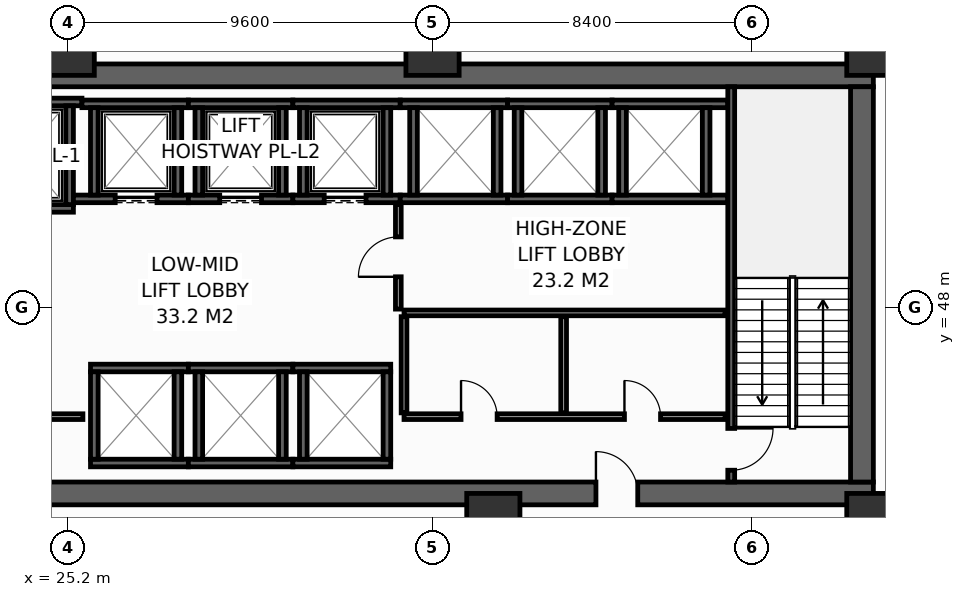
"""IFC4 building model, lengths in metres.
Left out: names, types, materials, properties, quantities, classifications, styles, units other than length and angle.
Written with IfcOpenShell. Run it as: python <this file> out.ifc"""

import sys

from ifc_helpers import new_model, si_unit, direction, frame, frame_2d, origin, origin_2d, place, context, subcontext, project, spatial, rectangle, hollow_rectangle, extrude, element, fill, save


model = new_model("IFC4")
c1 = context("Model", 3, precision=1e-05, world=origin(), true_north=direction((0.0, 1.0)))
c2 = subcontext(c1, "Body", "Model", "MODEL_VIEW")
j1 = project(units=[si_unit("LENGTHUNIT", "METRE"), si_unit("PLANEANGLEUNIT", "RADIAN")], contexts=[c1])
p1 = place(None, origin())
s1 = spatial("IfcSite", under=j1, at=p1, CompositionType="ELEMENT")
p2 = place(p1, origin())
s2 = spatial("IfcBuilding", under=s1, at=p2, CompositionType="ELEMENT")
p3 = place(p2, frame((0.0, 0.0, 16.8)))
s3 = spatial("IfcBuildingStorey", under=s2, at=p3, CompositionType="ELEMENT", Elevation=16.8)
p4 = place(p3, frame((13.5, 43.1, 0.0), z_axis=(0.0, 0.0, 1.0), x_axis=(1.0, 0.0, 0.0)))
e1 = element("IfcWall", 1, at=p4, inside=s3, PredefinedType="SHEAR", context=c2, shape_type="SweptSolid", body=[
    extrude(rectangle(XDim=32.9, YDim=0.6, at=frame_2d((16.45, 0.0))), origin(), (0.0, 0.0, 1.0), 5.1),
])
p5 = place(p4, frame((5.4, 0.0, 0.0)))
e2 = element("IfcOpeningElement", 2, at=p5, cuts=e1, PredefinedType="OPENING", context=c2, shape_type="SweptSolid", body=[
    extrude(rectangle(XDim=1.1, YDim=2.15, at=frame_2d((0.55, 1.075))), frame((0.0, 0.31, 0.0), z_axis=(0.0, -1.0, 0.0), x_axis=(1.0, 0.0, 0.0)), (0.0, 0.0, 1.0), 0.62),
])
p6 = place(p4, frame((25.6, 0.0, 0.0)))
e3 = element("IfcOpeningElement", 3, at=p6, cuts=e1, PredefinedType="OPENING", context=c2, shape_type="SweptSolid", body=[
    extrude(rectangle(XDim=1.1, YDim=2.15, at=frame_2d((0.55, 1.075))), frame((0.0, 0.31, 0.0), z_axis=(0.0, -1.0, 0.0), x_axis=(1.0, 0.0, 0.0)), (0.0, 0.0, 1.0), 0.62),
])
p7 = place(p3, frame((13.5, 54.1, 0.0), z_axis=(0.0, 0.0, 1.0), x_axis=(1.0, 0.0, 0.0)))
e4 = element("IfcWall", 4, at=p7, inside=s3, PredefinedType="SHEAR", context=c2, shape_type="SweptSolid", body=[
    extrude(rectangle(XDim=32.9, YDim=0.6, at=frame_2d((16.45, 0.0))), origin(), (0.0, 0.0, 1.0), 5.1),
])
p8 = place(p3, frame((46.1, 43.4, 0.0), z_axis=(0.0, 0.0, 1.0), x_axis=(0.0, 1.0, 0.0)))
e5 = element("IfcWall", 5, at=p8, inside=s3, PredefinedType="SHEAR", context=c2, shape_type="SweptSolid", body=[
    extrude(rectangle(XDim=10.4, YDim=0.6, at=frame_2d((5.2, 0.0))), origin(), (0.0, 0.0, 1.0), 5.1),
])
for number, where, z_axis, x_axis in (
    (6, (25.2, 54.8, 0.0), (0.0, 0.0, 1.0), (1.0, 0.0, 0.0)),
    (7, (34.8, 54.8, 0.0), (0.0, 0.0, 1.0), (1.0, 0.0, 0.0)),
    (8, (46.4, 54.8, 0.0), (0.0, 0.0, 1.0), (1.0, 0.0, 0.0)),
    (9, (36.4, 42.4, 0.0), (0.0, 0.0, 1.0), (1.0, 0.0, 0.0)),
    (10, (46.4, 42.4, 0.0), (0.0, 0.0, 1.0), (1.0, 0.0, 0.0)),
):
    element("IfcColumn", number, at=place(p3, frame(where, z_axis=z_axis, x_axis=x_axis)), inside=s3, PredefinedType="COLUMN", context=c2, shape_type="SweptSolid", body=[
        extrude(hollow_rectangle(XDim=1.4, YDim=1.4, WallThickness=0.065, at=origin_2d()), origin(), (0.0, 0.0, 1.0), 5.4),
    ])
p9 = place(p3, frame((22.5, 50.6, 0.0), z_axis=(0.0, 0.0, 1.0), x_axis=(1.0, 0.0, 0.0)))
e11 = element("IfcWall", 11, at=p9, inside=s3, PredefinedType="SHEAR", context=c2, shape_type="SweptSolid", body=[
    extrude(rectangle(XDim=2.85, YDim=0.2, at=frame_2d((1.425, 0.0))), origin(), (0.0, 0.0, 1.0), 5.1),
])
p10 = place(p9, frame((0.925, 0.0, 0.0)))
e12 = element("IfcOpeningElement", 12, at=p10, cuts=e11, PredefinedType="OPENING", context=c2, shape_type="SweptSolid", body=[
    extrude(rectangle(XDim=1.25, YDim=2.3, at=frame_2d((0.625, 1.15))), frame((0.0, 0.11, 0.0), z_axis=(0.0, -1.0, 0.0), x_axis=(1.0, 0.0, 0.0)), (0.0, 0.0, 1.0), 0.22),
])
p11 = place(p3, frame((22.5, 53.4, 0.0), z_axis=(0.0, 0.0, 1.0), x_axis=(1.0, 0.0, 0.0)))
e13 = element("IfcWall", 13, at=p11, inside=s3, PredefinedType="SHEAR", context=c2, shape_type="SweptSolid", body=[
    extrude(rectangle(XDim=3.075, YDim=0.2, at=frame_2d((1.538, 0.0))), origin(), (0.0, 0.0, 1.0), 5.1),
])
p12 = place(p3, frame((25.25, 50.7, 0.0), z_axis=(0.0, 0.0, 1.0), x_axis=(0.0, 1.0, 0.0)))
e14 = element("IfcWall", 14, at=p12, inside=s3, PredefinedType="SHEAR", context=c2, shape_type="SweptSolid", body=[
    extrude(rectangle(XDim=2.6, YDim=0.2, at=frame_2d((1.3, 0.0))), origin(), (0.0, 0.0, 1.0), 5.1),
])
p13 = place(p3, frame((25.35, 50.85, 0.0), z_axis=(0.0, 0.0, 1.0), x_axis=(1.0, 0.0, 0.0)))
e15 = element("IfcWall", 15, at=p13, inside=s3, PredefinedType="SHEAR", context=c2, shape_type="SweptSolid", body=[
    extrude(rectangle(XDim=3.025, YDim=0.2, at=frame_2d((1.512, 0.0))), origin(), (0.0, 0.0, 1.0), 5.1),
])
p14 = place(p13, frame((1.1, 0.0, 0.0)))
e16 = element("IfcOpeningElement", 16, at=p14, cuts=e15, PredefinedType="OPENING", context=c2, shape_type="SweptSolid", body=[
    extrude(rectangle(XDim=1.1, YDim=2.2, at=frame_2d((0.55, 1.1))), frame((0.0, 0.11, 0.0), z_axis=(0.0, -1.0, 0.0), x_axis=(1.0, 0.0, 0.0)), (0.0, 0.0, 1.0), 0.22),
])
p15 = place(p3, frame((25.575, 53.35, 0.0), z_axis=(0.0, 0.0, 1.0), x_axis=(1.0, 0.0, 0.0)))
e17 = element("IfcWall", 17, at=p15, inside=s3, PredefinedType="SHEAR", context=c2, shape_type="SweptSolid", body=[
    extrude(rectangle(XDim=2.8, YDim=0.2, at=frame_2d((1.4, 0.0))), origin(), (0.0, 0.0, 1.0), 5.1),
])
for number, where, z_axis, x_axis in (
    (18, (25.9, 50.95, 0.0), (0.0, 0.0, 1.0), (0.0, 1.0, 0.0)),
    (19, (28.1, 50.95, 0.0), (0.0, 0.0, 1.0), (0.0, 1.0, 0.0)),
):
    element("IfcWall", number, at=place(p3, frame(where, z_axis=z_axis, x_axis=x_axis)), inside=s3, PredefinedType="SHEAR", context=c2, shape_type="SweptSolid", body=[
        extrude(rectangle(XDim=2.3, YDim=0.2, at=frame_2d((1.15, 0.0))), origin(), (0.0, 0.0, 1.0), 5.1),
    ])
p16 = place(p3, frame((28.375, 50.85, 0.0), z_axis=(0.0, 0.0, 1.0), x_axis=(1.0, 0.0, 0.0)))
e20 = element("IfcWall", 20, at=p16, inside=s3, PredefinedType="SHEAR", context=c2, shape_type="SweptSolid", body=[
    extrude(rectangle(XDim=2.75, YDim=0.2, at=frame_2d((1.375, 0.0))), origin(), (0.0, 0.0, 1.0), 5.1),
])
p17 = place(p16, frame((0.825, 0.0, 0.0)))
e21 = element("IfcOpeningElement", 21, at=p17, cuts=e20, PredefinedType="OPENING", context=c2, shape_type="SweptSolid", body=[
    extrude(rectangle(XDim=1.1, YDim=2.2, at=frame_2d((0.55, 1.1))), frame((0.0, 0.11, 0.0), z_axis=(0.0, -1.0, 0.0), x_axis=(1.0, 0.0, 0.0)), (0.0, 0.0, 1.0), 0.22),
])
p18 = place(p3, frame((28.375, 53.35, 0.0), z_axis=(0.0, 0.0, 1.0), x_axis=(1.0, 0.0, 0.0)))
e22 = element("IfcWall", 22, at=p18, inside=s3, PredefinedType="SHEAR", context=c2, shape_type="SweptSolid", body=[
    extrude(rectangle(XDim=2.75, YDim=0.2, at=frame_2d((1.375, 0.0))), origin(), (0.0, 0.0, 1.0), 5.1),
])
for number, where, z_axis, x_axis in (
    (23, (28.65, 50.95, 0.0), (0.0, 0.0, 1.0), (0.0, 1.0, 0.0)),
    (24, (30.85, 50.95, 0.0), (0.0, 0.0, 1.0), (0.0, 1.0, 0.0)),
):
    element("IfcWall", number, at=place(p3, frame(where, z_axis=z_axis, x_axis=x_axis)), inside=s3, PredefinedType="SHEAR", context=c2, shape_type="SweptSolid", body=[
        extrude(rectangle(XDim=2.3, YDim=0.2, at=frame_2d((1.15, 0.0))), origin(), (0.0, 0.0, 1.0), 5.1),
    ])
p19 = place(p3, frame((31.125, 50.85, 0.0), z_axis=(0.0, 0.0, 1.0), x_axis=(1.0, 0.0, 0.0)))
e25 = element("IfcWall", 25, at=p19, inside=s3, PredefinedType="SHEAR", context=c2, shape_type="SweptSolid", body=[
    extrude(rectangle(XDim=2.825, YDim=0.2, at=frame_2d((1.413, 0.0))), origin(), (0.0, 0.0, 1.0), 5.1),
])
p20 = place(p19, frame((0.825, 0.0, 0.0)))
e26 = element("IfcOpeningElement", 26, at=p20, cuts=e25, PredefinedType="OPENING", context=c2, shape_type="SweptSolid", body=[
    extrude(rectangle(XDim=1.1, YDim=2.2, at=frame_2d((0.55, 1.1))), frame((0.0, 0.11, 0.0), z_axis=(0.0, -1.0, 0.0), x_axis=(1.0, 0.0, 0.0)), (0.0, 0.0, 1.0), 0.22),
])
p21 = place(p3, frame((31.125, 53.35, 0.0), z_axis=(0.0, 0.0, 1.0), x_axis=(1.0, 0.0, 0.0)))
e27 = element("IfcWall", 27, at=p21, inside=s3, PredefinedType="SHEAR", context=c2, shape_type="SweptSolid", body=[
    extrude(rectangle(XDim=2.825, YDim=0.2, at=frame_2d((1.413, 0.0))), origin(), (0.0, 0.0, 1.0), 5.1),
])
for number, where, z_axis, x_axis in (
    (28, (31.4, 50.95, 0.0), (0.0, 0.0, 1.0), (0.0, 1.0, 0.0)),
    (29, (33.6, 50.95, 0.0), (0.0, 0.0, 1.0), (0.0, 1.0, 0.0)),
):
    element("IfcWall", number, at=place(p3, frame(where, z_axis=z_axis, x_axis=x_axis)), inside=s3, PredefinedType="SHEAR", context=c2, shape_type="SweptSolid", body=[
        extrude(rectangle(XDim=2.3, YDim=0.2, at=frame_2d((1.15, 0.0))), origin(), (0.0, 0.0, 1.0), 5.1),
    ])
for number, where, z_axis, x_axis in (
    (30, (25.8, 43.9, 0.0), (0.0, 0.0, 1.0), (1.0, 0.0, 0.0)),
    (31, (25.8, 46.4, 0.0), (0.0, 0.0, 1.0), (1.0, 0.0, 0.0)),
):
    element("IfcWall", number, at=place(p3, frame(where, z_axis=z_axis, x_axis=x_axis)), inside=s3, PredefinedType="SHEAR", context=c2, shape_type="SweptSolid", body=[
        extrude(rectangle(XDim=2.575, YDim=0.2, at=frame_2d((1.288, 0.0))), origin(), (0.0, 0.0, 1.0), 5.1),
    ])
for number, where, z_axis, x_axis in (
    (32, (25.9, 44.0, 0.0), (0.0, 0.0, 1.0), (0.0, 1.0, 0.0)),
    (33, (28.1, 44.0, 0.0), (0.0, 0.0, 1.0), (0.0, 1.0, 0.0)),
):
    element("IfcWall", number, at=place(p3, frame(where, z_axis=z_axis, x_axis=x_axis)), inside=s3, PredefinedType="SHEAR", context=c2, shape_type="SweptSolid", body=[
        extrude(rectangle(XDim=2.3, YDim=0.2, at=frame_2d((1.15, 0.0))), origin(), (0.0, 0.0, 1.0), 5.1),
    ])
for number, where, z_axis, x_axis in (
    (34, (28.375, 43.9, 0.0), (0.0, 0.0, 1.0), (1.0, 0.0, 0.0)),
    (35, (28.375, 46.4, 0.0), (0.0, 0.0, 1.0), (1.0, 0.0, 0.0)),
):
    element("IfcWall", number, at=place(p3, frame(where, z_axis=z_axis, x_axis=x_axis)), inside=s3, PredefinedType="SHEAR", context=c2, shape_type="SweptSolid", body=[
        extrude(rectangle(XDim=2.75, YDim=0.2, at=frame_2d((1.375, 0.0))), origin(), (0.0, 0.0, 1.0), 5.1),
    ])
for number, where, z_axis, x_axis in (
    (36, (28.65, 44.0, 0.0), (0.0, 0.0, 1.0), (0.0, 1.0, 0.0)),
    (37, (30.85, 44.0, 0.0), (0.0, 0.0, 1.0), (0.0, 1.0, 0.0)),
):
    element("IfcWall", number, at=place(p3, frame(where, z_axis=z_axis, x_axis=x_axis)), inside=s3, PredefinedType="SHEAR", context=c2, shape_type="SweptSolid", body=[
        extrude(rectangle(XDim=2.3, YDim=0.2, at=frame_2d((1.15, 0.0))), origin(), (0.0, 0.0, 1.0), 5.1),
    ])
for number, where, z_axis, x_axis in (
    (38, (31.125, 43.9, 0.0), (0.0, 0.0, 1.0), (1.0, 0.0, 0.0)),
    (39, (31.125, 46.4, 0.0), (0.0, 0.0, 1.0), (1.0, 0.0, 0.0)),
):
    element("IfcWall", number, at=place(p3, frame(where, z_axis=z_axis, x_axis=x_axis)), inside=s3, PredefinedType="SHEAR", context=c2, shape_type="SweptSolid", body=[
        extrude(rectangle(XDim=2.575, YDim=0.2, at=frame_2d((1.288, 0.0))), origin(), (0.0, 0.0, 1.0), 5.1),
    ])
for number, where, z_axis, x_axis in (
    (40, (31.4, 44.0, 0.0), (0.0, 0.0, 1.0), (0.0, 1.0, 0.0)),
    (41, (33.6, 44.0, 0.0), (0.0, 0.0, 1.0), (0.0, 1.0, 0.0)),
):
    element("IfcWall", number, at=place(p3, frame(where, z_axis=z_axis, x_axis=x_axis)), inside=s3, PredefinedType="SHEAR", context=c2, shape_type="SweptSolid", body=[
        extrude(rectangle(XDim=2.3, YDim=0.2, at=frame_2d((1.15, 0.0))), origin(), (0.0, 0.0, 1.0), 5.1),
    ])
for number, where, z_axis, x_axis in (
    (42, (33.95, 50.85, 0.0), (0.0, 0.0, 1.0), (1.0, 0.0, 0.0)),
    (43, (33.95, 53.35, 0.0), (0.0, 0.0, 1.0), (1.0, 0.0, 0.0)),
):
    element("IfcWall", number, at=place(p3, frame(where, z_axis=z_axis, x_axis=x_axis)), inside=s3, PredefinedType="SHEAR", context=c2, shape_type="SweptSolid", body=[
        extrude(rectangle(XDim=2.825, YDim=0.2, at=frame_2d((1.413, 0.0))), origin(), (0.0, 0.0, 1.0), 5.1),
    ])
for number, where, z_axis, x_axis in (
    (44, (34.3, 50.95, 0.0), (0.0, 0.0, 1.0), (0.0, 1.0, 0.0)),
    (45, (36.5, 50.95, 0.0), (0.0, 0.0, 1.0), (0.0, 1.0, 0.0)),
):
    element("IfcWall", number, at=place(p3, frame(where, z_axis=z_axis, x_axis=x_axis)), inside=s3, PredefinedType="SHEAR", context=c2, shape_type="SweptSolid", body=[
        extrude(rectangle(XDim=2.3, YDim=0.2, at=frame_2d((1.15, 0.0))), origin(), (0.0, 0.0, 1.0), 5.1),
    ])
for number, where, z_axis, x_axis in (
    (46, (36.775, 50.85, 0.0), (0.0, 0.0, 1.0), (1.0, 0.0, 0.0)),
    (47, (36.775, 53.35, 0.0), (0.0, 0.0, 1.0), (1.0, 0.0, 0.0)),
):
    element("IfcWall", number, at=place(p3, frame(where, z_axis=z_axis, x_axis=x_axis)), inside=s3, PredefinedType="SHEAR", context=c2, shape_type="SweptSolid", body=[
        extrude(rectangle(XDim=2.75, YDim=0.2, at=frame_2d((1.375, 0.0))), origin(), (0.0, 0.0, 1.0), 5.1),
    ])
for number, where, z_axis, x_axis in (
    (48, (37.05, 50.95, 0.0), (0.0, 0.0, 1.0), (0.0, 1.0, 0.0)),
    (49, (39.25, 50.95, 0.0), (0.0, 0.0, 1.0), (0.0, 1.0, 0.0)),
):
    element("IfcWall", number, at=place(p3, frame(where, z_axis=z_axis, x_axis=x_axis)), inside=s3, PredefinedType="SHEAR", context=c2, shape_type="SweptSolid", body=[
        extrude(rectangle(XDim=2.3, YDim=0.2, at=frame_2d((1.15, 0.0))), origin(), (0.0, 0.0, 1.0), 5.1),
    ])
for number, where, z_axis, x_axis in (
    (50, (39.525, 50.85, 0.0), (0.0, 0.0, 1.0), (1.0, 0.0, 0.0)),
    (51, (39.525, 53.35, 0.0), (0.0, 0.0, 1.0), (1.0, 0.0, 0.0)),
):
    element("IfcWall", number, at=place(p3, frame(where, z_axis=z_axis, x_axis=x_axis)), inside=s3, PredefinedType="SHEAR", context=c2, shape_type="SweptSolid", body=[
        extrude(rectangle(XDim=3.045, YDim=0.2, at=frame_2d((1.522, 0.0))), origin(), (0.0, 0.0, 1.0), 5.1),
    ])
for number, where, z_axis, x_axis in (
    (52, (39.8, 50.95, 0.0), (0.0, 0.0, 1.0), (0.0, 1.0, 0.0)),
    (53, (42.0, 50.95, 0.0), (0.0, 0.0, 1.0), (0.0, 1.0, 0.0)),
):
    element("IfcWall", number, at=place(p3, frame(where, z_axis=z_axis, x_axis=x_axis)), inside=s3, PredefinedType="SHEAR", context=c2, shape_type="SweptSolid", body=[
        extrude(rectangle(XDim=2.3, YDim=0.2, at=frame_2d((1.15, 0.0))), origin(), (0.0, 0.0, 1.0), 5.1),
    ])
p22 = place(p3, frame((42.66, 53.8, 0.0), z_axis=(0.0, 0.0, 1.0), x_axis=(0.0, -1.0, 0.0)))
e54 = element("IfcWall", 54, at=p22, inside=s3, PredefinedType="SHEAR", context=c2, shape_type="SweptSolid", body=[
    extrude(rectangle(XDim=10.4, YDim=0.18, at=frame_2d((5.2, 0.0))), origin(), (0.0, 0.0, 1.0), 5.1),
])
p23 = place(p22, frame((8.99, 0.0, 0.0)))
e55 = element("IfcOpeningElement", 55, at=p23, cuts=e54, PredefinedType="OPENING", context=c2, shape_type="SweptSolid", body=[
    extrude(rectangle(XDim=1.1, YDim=2.15, at=frame_2d((0.55, 1.075))), frame((0.0, 0.1, 0.0), z_axis=(0.0, -1.0, 0.0), x_axis=(1.0, 0.0, 0.0)), (0.0, 0.0, 1.0), 0.2),
])
p24 = place(p3, frame((22.68, 45.12, 0.0), z_axis=(0.0, 0.0, 1.0), x_axis=(1.0, 0.0, 0.0)))
e56 = element("IfcWall", 56, at=p24, inside=s3, PredefinedType="PARTITIONING", context=c2, shape_type="SweptSolid", body=[
    extrude(rectangle(XDim=2.92, YDim=0.15, at=frame_2d((1.46, 0.0))), origin(), (0.0, 0.0, 1.0), 5.1),
])
p25 = place(p24, frame((0.85, 0.0, 0.0)))
e57 = element("IfcOpeningElement", 57, at=p25, cuts=e56, PredefinedType="OPENING", context=c2, shape_type="SweptSolid", body=[
    extrude(rectangle(XDim=1.1, YDim=2.15, at=frame_2d((0.55, 1.075))), frame((0.0, 0.085, 0.0), z_axis=(0.0, -1.0, 0.0), x_axis=(1.0, 0.0, 0.0)), (0.0, 0.0, 1.0), 0.17),
])
p26 = place(p3, frame((33.9, 47.95, 0.0), z_axis=(0.0, 0.0, 1.0), x_axis=(0.0, 1.0, 0.0)))
e58 = element("IfcWall", 58, at=p26, inside=s3, PredefinedType="PARTITIONING", context=c2, shape_type="SweptSolid", body=[
    extrude(rectangle(XDim=2.75, YDim=0.15, at=frame_2d((1.375, 0.0))), origin(), (0.0, 0.0, 1.0), 5.1),
])
p27 = place(p26, frame((0.85, 0.0, 0.0)))
e59 = element("IfcOpeningElement", 59, at=p27, cuts=e58, PredefinedType="OPENING", context=c2, shape_type="SweptSolid", body=[
    extrude(rectangle(XDim=1.05, YDim=2.15, at=frame_2d((0.525, 1.075))), frame((0.0, 0.085, 0.0), z_axis=(0.0, -1.0, 0.0), x_axis=(1.0, 0.0, 0.0)), (0.0, 0.0, 1.0), 0.17),
])
p28 = place(p3, frame((34.05, 45.12, 0.0), z_axis=(0.0, 0.0, 1.0), x_axis=(1.0, 0.0, 0.0)))
e60 = element("IfcWall", 60, at=p28, inside=s3, PredefinedType="PARTITIONING", context=c2, shape_type="SweptSolid", body=[
    extrude(rectangle(XDim=8.45, YDim=0.15, at=frame_2d((4.225, 0.0))), origin(), (0.0, 0.0, 1.0), 5.1),
])
p29 = place(p28, frame((1.5, 0.0, 0.0)))
e61 = element("IfcOpeningElement", 61, at=p29, cuts=e60, PredefinedType="OPENING", context=c2, shape_type="SweptSolid", body=[
    extrude(rectangle(XDim=0.95, YDim=2.15, at=frame_2d((0.475, 1.075))), frame((0.0, 0.085, 0.0), z_axis=(0.0, -1.0, 0.0), x_axis=(1.0, 0.0, 0.0)), (0.0, 0.0, 1.0), 0.17),
])
p30 = place(p28, frame((5.8, 0.0, 0.0)))
e62 = element("IfcOpeningElement", 62, at=p30, cuts=e60, PredefinedType="OPENING", context=c2, shape_type="SweptSolid", body=[
    extrude(rectangle(XDim=0.95, YDim=2.15, at=frame_2d((0.475, 1.075))), frame((0.0, 0.085, 0.0), z_axis=(0.0, -1.0, 0.0), x_axis=(1.0, 0.0, 0.0)), (0.0, 0.0, 1.0), 0.17),
])
p31 = place(p3, frame((34.05, 47.85, 0.0), z_axis=(0.0, 0.0, 1.0), x_axis=(1.0, 0.0, 0.0)))
e63 = element("IfcWall", 63, at=p31, inside=s3, PredefinedType="PARTITIONING", context=c2, shape_type="SweptSolid", body=[
    extrude(rectangle(XDim=8.45, YDim=0.15, at=frame_2d((4.225, 0.0))), origin(), (0.0, 0.0, 1.0), 5.1),
])
for number, where, z_axis, x_axis in (
    (64, (38.25, 45.22, 0.0), (0.0, 0.0, 1.0), (0.0, 1.0, 0.0)),
    (65, (34.05, 45.22, 0.0), (0.0, 0.0, 1.0), (0.0, 1.0, 0.0)),
):
    element("IfcWall", number, at=place(p3, frame(where, z_axis=z_axis, x_axis=x_axis)), inside=s3, PredefinedType="PARTITIONING", context=c2, shape_type="SweptSolid", body=[
        extrude(rectangle(XDim=2.53, YDim=0.15, at=frame_2d((1.265, 0.0))), origin(), (0.0, 0.0, 1.0), 5.1),
    ])
p32 = place(p14, origin())
e66 = element("IfcDoor", 66, at=p32, inside=s3, OperationType="SLIDING_TO_LEFT", PredefinedType="DOOR", context=c2, shape_type="SweptSolid", body=[
    extrude(rectangle(XDim=1.1, YDim=2.2, at=frame_2d((0.55, 1.1))), frame((0.0, 0.025, 0.0), z_axis=(0.0, -1.0, 0.0), x_axis=(1.0, 0.0, 0.0)), (0.0, 0.0, 1.0), 0.05),
])
fill(e16, e66)
p33 = place(p17, origin())
e67 = element("IfcDoor", 67, at=p33, inside=s3, OperationType="SLIDING_TO_LEFT", PredefinedType="DOOR", context=c2, shape_type="SweptSolid", body=[
    extrude(rectangle(XDim=1.1, YDim=2.2, at=frame_2d((0.55, 1.1))), frame((0.0, 0.025, 0.0), z_axis=(0.0, -1.0, 0.0), x_axis=(1.0, 0.0, 0.0)), (0.0, 0.0, 1.0), 0.05),
])
fill(e21, e67)
p34 = place(p20, origin())
e68 = element("IfcDoor", 68, at=p34, inside=s3, OperationType="SLIDING_TO_LEFT", PredefinedType="DOOR", context=c2, shape_type="SweptSolid", body=[
    extrude(rectangle(XDim=1.1, YDim=2.2, at=frame_2d((0.55, 1.1))), frame((0.0, 0.025, 0.0), z_axis=(0.0, -1.0, 0.0), x_axis=(1.0, 0.0, 0.0)), (0.0, 0.0, 1.0), 0.05),
])
fill(e26, e68)
p35 = place(p23, origin())
e69 = element("IfcDoor", 69, at=p35, inside=s3, OperationType="SINGLE_SWING_LEFT", PredefinedType="DOOR", context=c2, shape_type="SweptSolid", body=[
    extrude(rectangle(XDim=1.1, YDim=2.15, at=frame_2d((0.55, 1.075))), frame((0.0, 0.025, 0.0), z_axis=(0.0, -1.0, 0.0), x_axis=(1.0, 0.0, 0.0)), (0.0, 0.0, 1.0), 0.05),
])
fill(e55, e69)
p36 = place(p6, origin())
e70 = element("IfcDoor", 70, at=p36, inside=s3, OperationType="SINGLE_SWING_LEFT", PredefinedType="DOOR", context=c2, shape_type="SweptSolid", body=[
    extrude(rectangle(XDim=1.1, YDim=2.15, at=frame_2d((0.55, 1.075))), frame((0.0, 0.025, 0.0), z_axis=(0.0, -1.0, 0.0), x_axis=(1.0, 0.0, 0.0)), (0.0, 0.0, 1.0), 0.05),
])
fill(e3, e70)
p37 = place(p27, origin())
e71 = element("IfcDoor", 71, at=p37, inside=s3, OperationType="SINGLE_SWING_LEFT", PredefinedType="DOOR", context=c2, shape_type="SweptSolid", body=[
    extrude(rectangle(XDim=1.05, YDim=2.15, at=frame_2d((0.525, 1.075))), frame((0.0, 0.025, 0.0), z_axis=(0.0, -1.0, 0.0), x_axis=(1.0, 0.0, 0.0)), (0.0, 0.0, 1.0), 0.05),
])
fill(e59, e71)
p38 = place(p29, origin())
e72 = element("IfcDoor", 72, at=p38, inside=s3, OperationType="SINGLE_SWING_LEFT", PredefinedType="DOOR", context=c2, shape_type="SweptSolid", body=[
    extrude(rectangle(XDim=0.95, YDim=2.15, at=frame_2d((0.475, 1.075))), frame((0.0, 0.025, 0.0), z_axis=(0.0, -1.0, 0.0), x_axis=(1.0, 0.0, 0.0)), (0.0, 0.0, 1.0), 0.05),
])
fill(e61, e72)
p39 = place(p30, origin())
e73 = element("IfcDoor", 73, at=p39, inside=s3, OperationType="SINGLE_SWING_LEFT", PredefinedType="DOOR", context=c2, shape_type="SweptSolid", body=[
    extrude(rectangle(XDim=0.95, YDim=2.15, at=frame_2d((0.475, 1.075))), frame((0.0, 0.025, 0.0), z_axis=(0.0, -1.0, 0.0), x_axis=(1.0, 0.0, 0.0)), (0.0, 0.0, 1.0), 0.05),
])
fill(e62, e73)
save(model, sys.argv[1])
